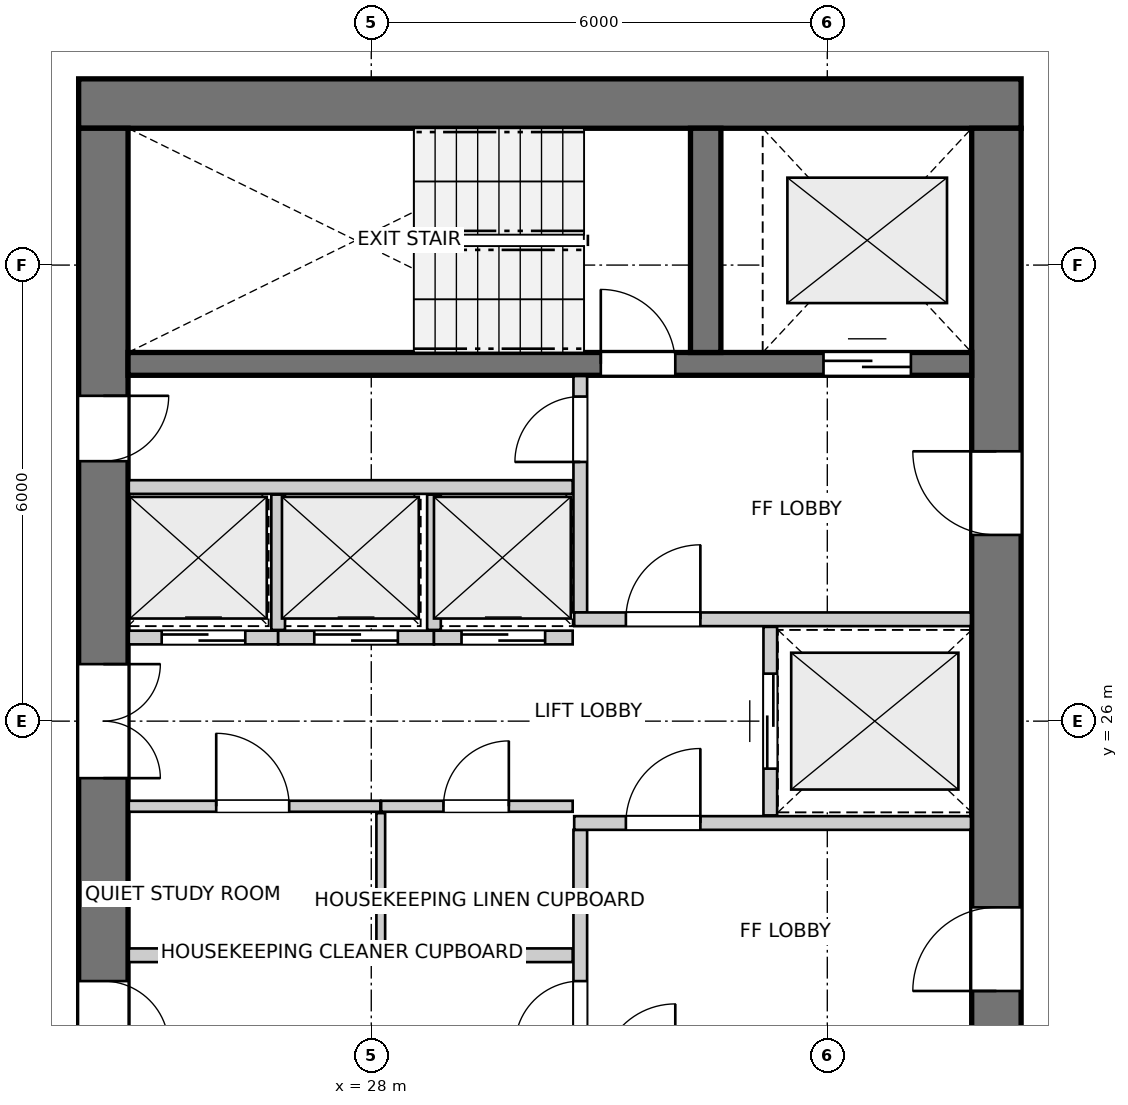
"""IFC4 building model, lengths in metres.
Left out: names, types, materials, properties, quantities, classifications, styles, units other than length and angle.
Written with IfcOpenShell. Run it as: python <this file> out.ifc"""

import sys

from ifc_helpers import new_model, si_unit, direction, frame, frame_2d, origin, place, context, subcontext, project, spatial, rectangle, extrude, source, transform, mapped, element, fill, save


model = new_model("IFC4")
c1 = context("Model", 3, precision=1e-05, world=origin(), true_north=direction((0.0, 1.0)))
c2 = subcontext(c1, "Body", "Model", "MODEL_VIEW")
j1 = project(units=[si_unit("LENGTHUNIT", "METRE"), si_unit("PLANEANGLEUNIT", "RADIAN")], contexts=[c1])
p1 = place(None, origin())
s1 = spatial("IfcSite", under=j1, at=p1, CompositionType="ELEMENT")
p2 = place(p1, origin())
s2 = spatial("IfcBuilding", under=s1, at=p2, CompositionType="ELEMENT")
p3 = place(p2, frame((0.0, 0.0, 168.2)))
s3 = spatial("IfcBuildingStorey", under=s2, at=p3, CompositionType="ELEMENT", Elevation=168.2)
p4 = place(p3, frame((36.55, 34.125, 0.0), z_axis=(0.0, 0.0, 1.0), x_axis=(-1.0, 0.0, 0.0)))
e1 = element("IfcWall", 1, at=p4, inside=s3, PredefinedType="SHEAR", context=c2, shape_type="SweptSolid", body=[
    extrude(rectangle(XDim=12.4, YDim=0.65, at=frame_2d((6.2, 0.0))), origin(), (0.0, 0.0, 1.0), 2.95),
])
p5 = place(p3, frame((24.475, 33.8, 0.0), z_axis=(0.0, 0.0, 1.0), x_axis=(0.0, -1.0, 0.0)))
e2 = element("IfcWall", 2, at=p5, inside=s3, PredefinedType="SHEAR", context=c2, shape_type="SweptSolid", body=[
    extrude(rectangle(XDim=15.6, YDim=0.65, at=frame_2d((7.8, 0.0))), origin(), (0.0, 0.0, 1.0), 2.95),
])
p6 = place(p5, frame((7.05, 0.0, 0.0)))
e3 = element("IfcOpeningElement", 3, at=p6, cuts=e2, PredefinedType="OPENING", context=c2, shape_type="SweptSolid", body=[
    extrude(rectangle(XDim=1.5, YDim=2.15, at=frame_2d((0.75, 1.075))), frame((0.0, 0.335, 0.0), z_axis=(0.0, -1.0, 0.0), x_axis=(1.0, 0.0, 0.0)), (0.0, 0.0, 1.0), 0.67),
])
p7 = place(p5, frame((3.52, 0.0, 0.0)))
e4 = element("IfcOpeningElement", 4, at=p7, cuts=e2, PredefinedType="OPENING", context=c2, shape_type="SweptSolid", body=[
    extrude(rectangle(XDim=0.86, YDim=2.05, at=frame_2d((0.43, 1.025))), frame((0.0, 0.335, 0.0), z_axis=(0.0, -1.0, 0.0), x_axis=(1.0, 0.0, 0.0)), (0.0, 0.0, 1.0), 0.67),
])
p8 = place(p5, frame((11.22, 0.0, 0.0)))
e5 = element("IfcOpeningElement", 5, at=p8, cuts=e2, PredefinedType="OPENING", context=c2, shape_type="SweptSolid", body=[
    extrude(rectangle(XDim=0.86, YDim=2.05, at=frame_2d((0.43, 1.025))), frame((0.0, 0.335, 0.0), z_axis=(0.0, -1.0, 0.0), x_axis=(1.0, 0.0, 0.0)), (0.0, 0.0, 1.0), 0.67),
])
p9 = place(p3, frame((36.225, 18.2, 0.0), z_axis=(0.0, 0.0, 1.0), x_axis=(0.0, 1.0, 0.0)))
e6 = element("IfcWall", 6, at=p9, inside=s3, PredefinedType="SHEAR", context=c2, shape_type="SweptSolid", body=[
    extrude(rectangle(XDim=15.6, YDim=0.65, at=frame_2d((7.8, 0.0))), origin(), (0.0, 0.0, 1.0), 2.95),
])
p10 = place(p9, frame((4.25, 0.0, 0.0)))
e7 = element("IfcOpeningElement", 7, at=p10, cuts=e6, PredefinedType="OPENING", context=c2, shape_type="SweptSolid", body=[
    extrude(rectangle(XDim=1.1, YDim=2.15, at=frame_2d((0.55, 1.075))), frame((0.0, 0.335, 0.0), z_axis=(0.0, -1.0, 0.0), x_axis=(1.0, 0.0, 0.0)), (0.0, 0.0, 1.0), 0.67),
])
p11 = place(p9, frame((10.25, 0.0, 0.0)))
e8 = element("IfcOpeningElement", 8, at=p11, cuts=e6, PredefinedType="OPENING", context=c2, shape_type="SweptSolid", body=[
    extrude(rectangle(XDim=1.1, YDim=2.15, at=frame_2d((0.55, 1.075))), frame((0.0, 0.335, 0.0), z_axis=(0.0, -1.0, 0.0), x_axis=(1.0, 0.0, 0.0)), (0.0, 0.0, 1.0), 0.67),
])
p12 = place(p3, frame((24.8, 30.7, 0.0), z_axis=(0.0, 0.0, 1.0), x_axis=(1.0, 0.0, 0.0)))
e9 = element("IfcWall", 9, at=p12, inside=s3, PredefinedType="SHEAR", context=c2, shape_type="SweptSolid", body=[
    extrude(rectangle(XDim=11.1, YDim=0.3, at=frame_2d((5.55, 0.0))), origin(), (0.0, 0.0, 1.0), 2.95),
])
p13 = place(p12, frame((6.22, 0.0, 0.0)))
e10 = element("IfcOpeningElement", 10, at=p13, cuts=e9, PredefinedType="OPENING", context=c2, shape_type="SweptSolid", body=[
    extrude(rectangle(XDim=0.98, YDim=2.15, at=frame_2d((0.49, 1.075))), frame((0.0, 0.16, 0.0), z_axis=(0.0, -1.0, 0.0), x_axis=(1.0, 0.0, 0.0)), (0.0, 0.0, 1.0), 0.32),
])
p14 = place(p12, frame((9.15, 0.0, 0.0)))
e11 = element("IfcOpeningElement", 11, at=p14, cuts=e9, PredefinedType="OPENING", context=c2, shape_type="SweptSolid", body=[
    extrude(rectangle(XDim=1.15, YDim=2.15, at=frame_2d((0.575, 1.075))), frame((0.0, 0.16, 0.0), z_axis=(0.0, -1.0, 0.0), x_axis=(1.0, 0.0, 0.0)), (0.0, 0.0, 1.0), 0.32),
])
p15 = place(p3, frame((32.4, 30.85, 0.0), z_axis=(0.0, 0.0, 1.0), x_axis=(0.0, 1.0, 0.0)))
e12 = element("IfcWall", 12, at=p15, inside=s3, PredefinedType="SHEAR", context=c2, shape_type="SweptSolid", body=[
    extrude(rectangle(XDim=2.95, YDim=0.4, at=frame_2d((1.475, 0.0))), origin(), (0.0, 0.0, 1.0), 2.95),
])
p16 = place(p3, frame((30.75, 21.46, 0.0), z_axis=(0.0, 0.0, 1.0), x_axis=(0.0, 1.0, 0.0)))
e13 = element("IfcWall", 13, at=p16, inside=s3, PredefinedType="PARTITIONING", context=c2, shape_type="SweptSolid", body=[
    extrude(rectangle(XDim=3.11, YDim=0.18, at=frame_2d((1.555, 0.0))), origin(), (0.0, 0.0, 1.0), 2.95),
])
p17 = place(p16, frame((0.26, 0.0, 0.0)))
e14 = element("IfcOpeningElement", 14, at=p17, cuts=e13, PredefinedType="OPENING", context=c2, shape_type="SweptSolid", body=[
    extrude(rectangle(XDim=0.86, YDim=2.05, at=frame_2d((0.43, 1.025))), frame((0.0, 0.1, 0.0), z_axis=(0.0, -1.0, 0.0), x_axis=(1.0, 0.0, 0.0)), (0.0, 0.0, 1.0), 0.2),
])
p18 = place(p3, frame((30.67, 24.66, 0.0), z_axis=(0.0, 0.0, 1.0), x_axis=(1.0, 0.0, 0.0)))
e15 = element("IfcWall", 15, at=p18, inside=s3, PredefinedType="PARTITIONING", context=c2, shape_type="SweptSolid", body=[
    extrude(rectangle(XDim=5.22, YDim=0.18, at=frame_2d((2.61, 0.0))), origin(), (0.0, 0.0, 1.0), 2.95),
])
p19 = place(p18, frame((0.68, 0.0, 0.0)))
e16 = element("IfcOpeningElement", 16, at=p19, cuts=e15, PredefinedType="OPENING", context=c2, shape_type="SweptSolid", body=[
    extrude(rectangle(XDim=0.98, YDim=2.15, at=frame_2d((0.49, 1.075))), frame((0.0, 0.1, 0.0), z_axis=(0.0, -1.0, 0.0), x_axis=(1.0, 0.0, 0.0)), (0.0, 0.0, 1.0), 0.2),
])
p20 = place(p3, frame((30.75, 27.43, 0.0), z_axis=(0.0, 0.0, 1.0), x_axis=(0.0, 1.0, 0.0)))
e17 = element("IfcWall", 17, at=p20, inside=s3, PredefinedType="PARTITIONING", context=c2, shape_type="SweptSolid", body=[
    extrude(rectangle(XDim=3.11, YDim=0.18, at=frame_2d((1.555, 0.0))), origin(), (0.0, 0.0, 1.0), 2.95),
])
p21 = place(p20, frame((1.98, 0.0, 0.0)))
e18 = element("IfcOpeningElement", 18, at=p21, cuts=e17, PredefinedType="OPENING", context=c2, shape_type="SweptSolid", body=[
    extrude(rectangle(XDim=0.86, YDim=2.05, at=frame_2d((0.43, 1.025))), frame((0.0, 0.1, 0.0), z_axis=(0.0, -1.0, 0.0), x_axis=(1.0, 0.0, 0.0)), (0.0, 0.0, 1.0), 0.2),
])
p22 = place(p3, frame((30.67, 27.34, 0.0), z_axis=(0.0, 0.0, 1.0), x_axis=(1.0, 0.0, 0.0)))
e19 = element("IfcWall", 19, at=p22, inside=s3, PredefinedType="PARTITIONING", context=c2, shape_type="SweptSolid", body=[
    extrude(rectangle(XDim=5.22, YDim=0.18, at=frame_2d((2.61, 0.0))), origin(), (0.0, 0.0, 1.0), 2.95),
])
p23 = place(p22, frame((0.68, 0.0, 0.0)))
e20 = element("IfcOpeningElement", 20, at=p23, cuts=e19, PredefinedType="OPENING", context=c2, shape_type="SweptSolid", body=[
    extrude(rectangle(XDim=0.98, YDim=2.15, at=frame_2d((0.49, 1.075))), frame((0.0, 0.1, 0.0), z_axis=(0.0, -1.0, 0.0), x_axis=(1.0, 0.0, 0.0)), (0.0, 0.0, 1.0), 0.2),
])
p24 = place(p3, frame((33.25, 24.76, 0.0), z_axis=(0.0, 0.0, 1.0), x_axis=(0.0, 1.0, 0.0)))
e21 = element("IfcWall", 21, at=p24, inside=s3, PredefinedType="PARTITIONING", context=c2, shape_type="SweptSolid", body=[
    extrude(rectangle(XDim=2.48, YDim=0.18, at=frame_2d((1.24, 0.0))), origin(), (0.0, 0.0, 1.0), 2.95),
])
p25 = place(p24, frame((0.615, 0.0, 0.0)))
e22 = element("IfcOpeningElement", 22, at=p25, cuts=e21, PredefinedType="OPENING", context=c2, shape_type="SweptSolid", body=[
    extrude(rectangle(XDim=1.25, YDim=2.15, at=frame_2d((0.625, 1.075))), frame((0.0, 0.1, 0.0), z_axis=(0.0, -1.0, 0.0), x_axis=(1.0, 0.0, 0.0)), (0.0, 0.0, 1.0), 0.2),
])
p26 = place(p3, frame((24.81, 22.92, 0.0), z_axis=(0.0, 0.0, 1.0), x_axis=(1.0, 0.0, 0.0)))
e23 = element("IfcWall", 23, at=p26, inside=s3, PredefinedType="PARTITIONING", context=c2, shape_type="SweptSolid", body=[
    extrude(rectangle(XDim=5.84, YDim=0.18, at=frame_2d((2.92, 0.0))), origin(), (0.0, 0.0, 1.0), 2.95),
])
p27 = place(p3, frame((24.81, 24.88, 0.0), z_axis=(0.0, 0.0, 1.0), x_axis=(1.0, 0.0, 0.0)))
e24 = element("IfcWall", 24, at=p27, inside=s3, PredefinedType="PARTITIONING", context=c2, shape_type="SweptSolid", body=[
    extrude(rectangle(XDim=3.31, YDim=0.145, at=frame_2d((1.655, 0.0))), origin(), (0.0, 0.0, 1.0), 2.95),
])
p28 = place(p27, frame((1.15, 0.0, 0.0)))
e25 = element("IfcOpeningElement", 25, at=p28, cuts=e24, PredefinedType="OPENING", context=c2, shape_type="SweptSolid", body=[
    extrude(rectangle(XDim=0.96, YDim=2.1, at=frame_2d((0.48, 1.05))), frame((0.0, 0.083, 0.0), z_axis=(0.0, -1.0, 0.0), x_axis=(1.0, 0.0, 0.0)), (0.0, 0.0, 1.0), 0.165),
])
p29 = place(p3, frame((28.13, 24.88, 0.0), z_axis=(0.0, 0.0, 1.0), x_axis=(1.0, 0.0, 0.0)))
e26 = element("IfcWall", 26, at=p29, inside=s3, PredefinedType="PARTITIONING", context=c2, shape_type="SweptSolid", body=[
    extrude(rectangle(XDim=2.52, YDim=0.145, at=frame_2d((1.26, 0.0))), origin(), (0.0, 0.0, 1.0), 2.95),
])
p30 = place(p29, frame((0.82, 0.0, 0.0)))
e27 = element("IfcOpeningElement", 27, at=p30, cuts=e26, PredefinedType="OPENING", context=c2, shape_type="SweptSolid", body=[
    extrude(rectangle(XDim=0.86, YDim=2.05, at=frame_2d((0.43, 1.025))), frame((0.0, 0.083, 0.0), z_axis=(0.0, -1.0, 0.0), x_axis=(1.0, 0.0, 0.0)), (0.0, 0.0, 1.0), 0.165),
])
p31 = place(p3, frame((28.125, 23.02, 0.0), z_axis=(0.0, 0.0, 1.0), x_axis=(0.0, 1.0, 0.0)))
e28 = element("IfcWall", 28, at=p31, inside=s3, PredefinedType="PARTITIONING", context=c2, shape_type="SweptSolid", body=[
    extrude(rectangle(XDim=1.77, YDim=0.115, at=frame_2d((0.885, 0.0))), origin(), (0.0, 0.0, 1.0), 2.95),
])
p32 = place(p3, frame((24.81, 29.08, 0.0), z_axis=(0.0, 0.0, 1.0), x_axis=(1.0, 0.0, 0.0)))
e29 = element("IfcWall", 29, at=p32, inside=s3, PredefinedType="PARTITIONING", context=c2, shape_type="SweptSolid", body=[
    extrude(rectangle(XDim=5.84, YDim=0.18, at=frame_2d((2.92, 0.0))), origin(), (0.0, 0.0, 1.0), 2.95),
])
p33 = place(p3, frame((24.81, 27.1, 0.0), z_axis=(0.0, 0.0, 1.0), x_axis=(1.0, 0.0, 0.0)))
e30 = element("IfcWall", 30, at=p33, inside=s3, PredefinedType="PARTITIONING", context=c2, shape_type="SweptSolid", body=[
    extrude(rectangle(XDim=1.965, YDim=0.18, at=frame_2d((0.982, 0.0))), origin(), (0.0, 0.0, 1.0), 2.95),
])
p34 = place(p33, frame((0.433, 0.0, 0.0)))
e31 = element("IfcOpeningElement", 31, at=p34, cuts=e30, PredefinedType="OPENING", context=c2, shape_type="SweptSolid", body=[
    extrude(rectangle(XDim=1.1, YDim=2.15, at=frame_2d((0.55, 1.075))), frame((0.0, 0.1, 0.0), z_axis=(0.0, -1.0, 0.0), x_axis=(1.0, 0.0, 0.0)), (0.0, 0.0, 1.0), 0.2),
])
p35 = place(p3, frame((26.775, 27.1, 0.0), z_axis=(0.0, 0.0, 1.0), x_axis=(1.0, 0.0, 0.0)))
e32 = element("IfcWall", 32, at=p35, inside=s3, PredefinedType="PARTITIONING", context=c2, shape_type="SweptSolid", body=[
    extrude(rectangle(XDim=2.05, YDim=0.18, at=frame_2d((1.025, 0.0))), origin(), (0.0, 0.0, 1.0), 2.95),
])
p36 = place(p35, frame((0.475, 0.0, 0.0)))
e33 = element("IfcOpeningElement", 33, at=p36, cuts=e32, PredefinedType="OPENING", context=c2, shape_type="SweptSolid", body=[
    extrude(rectangle(XDim=1.1, YDim=2.15, at=frame_2d((0.55, 1.075))), frame((0.0, 0.1, 0.0), z_axis=(0.0, -1.0, 0.0), x_axis=(1.0, 0.0, 0.0)), (0.0, 0.0, 1.0), 0.2),
])
p37 = place(p3, frame((26.775, 27.2, 0.0), z_axis=(0.0, 0.0, 1.0), x_axis=(0.0, 1.0, 0.0)))
e34 = element("IfcWall", 34, at=p37, inside=s3, PredefinedType="PARTITIONING", context=c2, shape_type="SweptSolid", body=[
    extrude(rectangle(XDim=1.78, YDim=0.18, at=frame_2d((0.89, 0.0))), origin(), (0.0, 0.0, 1.0), 2.95),
])
p38 = place(p3, frame((28.825, 27.1, 0.0), z_axis=(0.0, 0.0, 1.0), x_axis=(1.0, 0.0, 0.0)))
e35 = element("IfcWall", 35, at=p38, inside=s3, PredefinedType="PARTITIONING", context=c2, shape_type="SweptSolid", body=[
    extrude(rectangle(XDim=1.825, YDim=0.18, at=frame_2d((0.913, 0.0))), origin(), (0.0, 0.0, 1.0), 2.95),
])
p39 = place(p38, frame((0.363, 0.0, 0.0)))
e36 = element("IfcOpeningElement", 36, at=p39, cuts=e35, PredefinedType="OPENING", context=c2, shape_type="SweptSolid", body=[
    extrude(rectangle(XDim=1.1, YDim=2.15, at=frame_2d((0.55, 1.075))), frame((0.0, 0.1, 0.0), z_axis=(0.0, -1.0, 0.0), x_axis=(1.0, 0.0, 0.0)), (0.0, 0.0, 1.0), 0.2),
])
p40 = place(p3, frame((28.825, 27.2, 0.0), z_axis=(0.0, 0.0, 1.0), x_axis=(0.0, 1.0, 0.0)))
e37 = element("IfcWall", 37, at=p40, inside=s3, PredefinedType="PARTITIONING", context=c2, shape_type="SweptSolid", body=[
    extrude(rectangle(XDim=1.78, YDim=0.18, at=frame_2d((0.89, 0.0))), origin(), (0.0, 0.0, 1.0), 2.95),
])
m1 = source(origin(), c2, "Body", "SweptSolid", [
    extrude(rectangle(XDim=0.98, YDim=2.15, at=frame_2d((0.49, 1.075))), frame((0.0, 0.025, 0.0), z_axis=(0.0, -1.0, 0.0), x_axis=(1.0, 0.0, 0.0)), (0.0, 0.0, 1.0), 0.05),
])
p41 = place(p13, origin())
e38 = element("IfcDoor", 38, at=p41, inside=s3, OperationType="SINGLE_SWING_LEFT", PredefinedType="DOOR", context=c2, shape_type="MappedRepresentation", body=[
    mapped(m1, transform((0.0, 0.0, 0.0), x_axis=(1.0, 0.0, 0.0), y_axis=(0.0, 1.0, 0.0), z_axis=(0.0, 0.0, 1.0), scale=1.0)),
])
fill(e10, e38)
m2 = source(origin(), c2, "Body", "SweptSolid", [
    extrude(rectangle(XDim=1.15, YDim=2.15, at=frame_2d((0.575, 1.075))), frame((0.0, 0.025, 0.0), z_axis=(0.0, -1.0, 0.0), x_axis=(1.0, 0.0, 0.0)), (0.0, 0.0, 1.0), 0.05),
])
p42 = place(p14, origin())
e39 = element("IfcDoor", 39, at=p42, inside=s3, OperationType="DOUBLE_DOOR_SLIDING", PredefinedType="DOOR", context=c2, shape_type="MappedRepresentation", body=[
    mapped(m2, transform((0.0, 0.0, 0.0), x_axis=(1.0, 0.0, 0.0), y_axis=(0.0, 1.0, 0.0), z_axis=(0.0, 0.0, 1.0), scale=1.0)),
])
fill(e11, e39)
m3 = source(origin(), c2, "Body", "SweptSolid", [
    extrude(rectangle(XDim=1.1, YDim=2.15, at=frame_2d((0.55, 1.075))), frame((0.0, 0.025, 0.0), z_axis=(0.0, -1.0, 0.0), x_axis=(1.0, 0.0, 0.0)), (0.0, 0.0, 1.0), 0.05),
])
p43 = place(p10, origin())
e40 = element("IfcDoor", 40, at=p43, inside=s3, OperationType="SINGLE_SWING_LEFT", PredefinedType="DOOR", context=c2, shape_type="MappedRepresentation", body=[
    mapped(m3, transform((0.0, 0.0, 0.0), x_axis=(1.0, 0.0, 0.0), y_axis=(0.0, 1.0, 0.0), z_axis=(0.0, 0.0, 1.0), scale=1.0)),
])
fill(e7, e40)
p44 = place(p11, origin())
e41 = element("IfcDoor", 41, at=p44, inside=s3, OperationType="SINGLE_SWING_RIGHT", PredefinedType="DOOR", context=c2, shape_type="MappedRepresentation", body=[
    mapped(m3, transform((0.0, 0.0, 0.0), x_axis=(1.0, 0.0, 0.0), y_axis=(0.0, 1.0, 0.0), z_axis=(0.0, 0.0, 1.0), scale=1.0)),
])
fill(e8, e41)
m4 = source(origin(), c2, "Body", "SweptSolid", [
    extrude(rectangle(XDim=1.5, YDim=2.15, at=frame_2d((0.75, 1.075))), frame((0.0, 0.025, 0.0), z_axis=(0.0, -1.0, 0.0), x_axis=(1.0, 0.0, 0.0)), (0.0, 0.0, 1.0), 0.05),
])
p45 = place(p6, origin())
e42 = element("IfcDoor", 42, at=p45, inside=s3, OperationType="DOUBLE_DOOR_SINGLE_SWING", PredefinedType="DOOR", context=c2, shape_type="MappedRepresentation", body=[
    mapped(m4, transform((0.0, 0.0, 0.0), x_axis=(1.0, 0.0, 0.0), y_axis=(0.0, 1.0, 0.0), z_axis=(0.0, 0.0, 1.0), scale=1.0)),
])
fill(e3, e42)
m5 = source(origin(), c2, "Body", "SweptSolid", [
    extrude(rectangle(XDim=0.86, YDim=2.05, at=frame_2d((0.43, 1.025))), frame((0.0, 0.025, 0.0), z_axis=(0.0, -1.0, 0.0), x_axis=(1.0, 0.0, 0.0)), (0.0, 0.0, 1.0), 0.05),
])
p46 = place(p7, origin())
e43 = element("IfcDoor", 43, at=p46, inside=s3, OperationType="SINGLE_SWING_LEFT", PredefinedType="DOOR", context=c2, shape_type="MappedRepresentation", body=[
    mapped(m5, transform((0.0, 0.0, 0.0), x_axis=(1.0, 0.0, 0.0), y_axis=(0.0, 1.0, 0.0), z_axis=(0.0, 0.0, 1.0), scale=1.0)),
])
fill(e4, e43)
p47 = place(p8, origin())
e44 = element("IfcDoor", 44, at=p47, inside=s3, OperationType="SINGLE_SWING_RIGHT", PredefinedType="DOOR", context=c2, shape_type="MappedRepresentation", body=[
    mapped(m5, transform((0.0, 0.0, 0.0), x_axis=(1.0, 0.0, 0.0), y_axis=(0.0, 1.0, 0.0), z_axis=(0.0, 0.0, 1.0), scale=1.0)),
])
fill(e5, e44)
p48 = place(p17, origin())
e45 = element("IfcDoor", 45, at=p48, inside=s3, OperationType="SINGLE_SWING_LEFT", PredefinedType="DOOR", context=c2, shape_type="MappedRepresentation", body=[
    mapped(m5, transform((0.0, 0.0, 0.0), x_axis=(1.0, 0.0, 0.0), y_axis=(0.0, 1.0, 0.0), z_axis=(0.0, 0.0, 1.0), scale=1.0)),
])
fill(e14, e45)
p49 = place(p19, origin())
e46 = element("IfcDoor", 46, at=p49, inside=s3, OperationType="SINGLE_SWING_RIGHT", PredefinedType="DOOR", context=c2, shape_type="MappedRepresentation", body=[
    mapped(m1, transform((0.0, 0.0, 0.0), x_axis=(1.0, 0.0, 0.0), y_axis=(0.0, 1.0, 0.0), z_axis=(0.0, 0.0, 1.0), scale=1.0)),
])
fill(e16, e46)
p50 = place(p21, origin())
e47 = element("IfcDoor", 47, at=p50, inside=s3, OperationType="SINGLE_SWING_LEFT", PredefinedType="DOOR", context=c2, shape_type="MappedRepresentation", body=[
    mapped(m5, transform((0.0, 0.0, 0.0), x_axis=(1.0, 0.0, 0.0), y_axis=(0.0, 1.0, 0.0), z_axis=(0.0, 0.0, 1.0), scale=1.0)),
])
fill(e18, e47)
p51 = place(p23, origin())
e48 = element("IfcDoor", 48, at=p51, inside=s3, OperationType="SINGLE_SWING_RIGHT", PredefinedType="DOOR", context=c2, shape_type="MappedRepresentation", body=[
    mapped(m1, transform((0.0, 0.0, 0.0), x_axis=(1.0, 0.0, 0.0), y_axis=(0.0, 1.0, 0.0), z_axis=(0.0, 0.0, 1.0), scale=1.0)),
])
fill(e20, e48)
m6 = source(origin(), c2, "Body", "SweptSolid", [
    extrude(rectangle(XDim=1.25, YDim=2.15, at=frame_2d((0.625, 1.075))), frame((0.0, 0.025, 0.0), z_axis=(0.0, -1.0, 0.0), x_axis=(1.0, 0.0, 0.0)), (0.0, 0.0, 1.0), 0.05),
])
p52 = place(p25, origin())
e49 = element("IfcDoor", 49, at=p52, inside=s3, OperationType="DOUBLE_DOOR_SLIDING", PredefinedType="DOOR", context=c2, shape_type="MappedRepresentation", body=[
    mapped(m6, transform((0.0, 0.0, 0.0), x_axis=(1.0, 0.0, 0.0), y_axis=(0.0, 1.0, 0.0), z_axis=(0.0, 0.0, 1.0), scale=1.0)),
])
fill(e22, e49)
m7 = source(origin(), c2, "Body", "SweptSolid", [
    extrude(rectangle(XDim=0.96, YDim=2.1, at=frame_2d((0.48, 1.05))), frame((0.0, 0.025, 0.0), z_axis=(0.0, -1.0, 0.0), x_axis=(1.0, 0.0, 0.0)), (0.0, 0.0, 1.0), 0.05),
])
p53 = place(p28, origin())
e50 = element("IfcDoor", 50, at=p53, inside=s3, OperationType="SINGLE_SWING_LEFT", PredefinedType="DOOR", context=c2, shape_type="MappedRepresentation", body=[
    mapped(m7, transform((0.0, 0.0, 0.0), x_axis=(1.0, 0.0, 0.0), y_axis=(0.0, 1.0, 0.0), z_axis=(0.0, 0.0, 1.0), scale=1.0)),
])
fill(e25, e50)
p54 = place(p30, origin())
e51 = element("IfcDoor", 51, at=p54, inside=s3, OperationType="SINGLE_SWING_RIGHT", PredefinedType="DOOR", context=c2, shape_type="MappedRepresentation", body=[
    mapped(m5, transform((0.0, 0.0, 0.0), x_axis=(1.0, 0.0, 0.0), y_axis=(0.0, 1.0, 0.0), z_axis=(0.0, 0.0, 1.0), scale=1.0)),
])
fill(e27, e51)
p55 = place(p34, origin())
e52 = element("IfcDoor", 52, at=p55, inside=s3, OperationType="DOUBLE_DOOR_SLIDING", PredefinedType="DOOR", context=c2, shape_type="MappedRepresentation", body=[
    mapped(m3, transform((0.0, 0.0, 0.0), x_axis=(1.0, 0.0, 0.0), y_axis=(0.0, 1.0, 0.0), z_axis=(0.0, 0.0, 1.0), scale=1.0)),
])
fill(e31, e52)
p56 = place(p36, origin())
e53 = element("IfcDoor", 53, at=p56, inside=s3, OperationType="DOUBLE_DOOR_SLIDING", PredefinedType="DOOR", context=c2, shape_type="MappedRepresentation", body=[
    mapped(m3, transform((0.0, 0.0, 0.0), x_axis=(1.0, 0.0, 0.0), y_axis=(0.0, 1.0, 0.0), z_axis=(0.0, 0.0, 1.0), scale=1.0)),
])
fill(e33, e53)
p57 = place(p39, origin())
e54 = element("IfcDoor", 54, at=p57, inside=s3, OperationType="DOUBLE_DOOR_SLIDING", PredefinedType="DOOR", context=c2, shape_type="MappedRepresentation", body=[
    mapped(m3, transform((0.0, 0.0, 0.0), x_axis=(1.0, 0.0, 0.0), y_axis=(0.0, 1.0, 0.0), z_axis=(0.0, 0.0, 1.0), scale=1.0)),
])
fill(e36, e54)
save(model, sys.argv[1])
